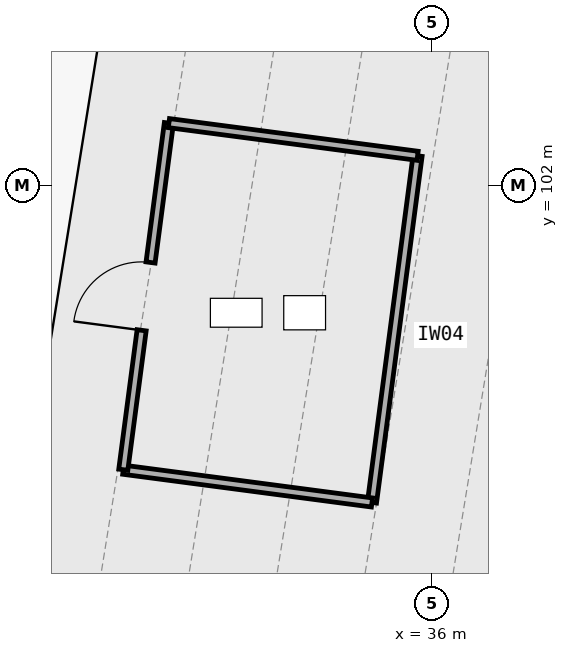
"""IFC4 building model, lengths in metres.
Left out: names, types, materials, properties, quantities, classifications, styles, units other than length and angle.
Written with IfcOpenShell. Run it as: python <this file> out.ifc"""

import sys

from ifc_helpers import new_model, si_unit, direction, frame, frame_2d, origin, place, context, subcontext, project, spatial, rectangle, extrude, element, fill, save


model = new_model("IFC4")
c1 = context("Model", 3, precision=1e-05, world=origin(), true_north=direction((0.0, 1.0)))
c2 = subcontext(c1, "Body", "Model", "MODEL_VIEW")
j1 = project(units=[si_unit("LENGTHUNIT", "METRE"), si_unit("PLANEANGLEUNIT", "RADIAN")], contexts=[c1])
p1 = place(None, origin())
s1 = spatial("IfcSite", under=j1, at=p1, CompositionType="ELEMENT")
p2 = place(p1, origin())
s2 = spatial("IfcBuilding", under=s1, at=p2, CompositionType="ELEMENT")
p3 = place(p2, frame((0.0, 0.0, 15.0)))
s3 = spatial("IfcBuildingStorey", under=s2, at=p3, CompositionType="ELEMENT", Elevation=15.0)
p4 = place(p3, frame((35.81, 102.393, 0.0), z_axis=(0.0, 0.0, 1.0), x_axis=(-0.130446275685, -0.991455379309, 0.0)))
e1 = element("IfcWall", 1, at=p4, inside=s3, PredefinedType="PARTITIONING", context=c2, shape_type="SweptSolid", body=[
    extrude(rectangle(XDim=4.6, YDim=0.12, at=frame_2d((2.3, 0.0))), origin(), (0.0, 0.0, 1.0), 4.52),
])
p5 = place(p3, frame((35.21, 97.832, 0.0), z_axis=(0.0, 0.0, 1.0), x_axis=(-0.991439181279, 0.130569329574, 0.0)))
e2 = element("IfcWall", 2, at=p5, inside=s3, PredefinedType="PARTITIONING", context=c2, shape_type="SweptSolid", body=[
    extrude(rectangle(XDim=3.3, YDim=0.12, at=frame_2d((1.65, 0.0))), origin(), (0.0, 0.0, 1.0), 4.52),
])
p6 = place(p3, frame((31.938, 98.263, 0.0), z_axis=(0.0, 0.0, 1.0), x_axis=(0.130473735985, 0.991451765956, 0.0)))
e3 = element("IfcWall", 3, at=p6, inside=s3, PredefinedType="PARTITIONING", context=c2, shape_type="SweptSolid", body=[
    extrude(rectangle(XDim=4.599, YDim=0.12, at=frame_2d((2.3, 0.0))), origin(), (0.0, 0.0, 1.0), 4.52),
])
p7 = place(p6, frame((1.85, 0.0, 0.0)))
e4 = element("IfcOpeningElement", 4, at=p7, cuts=e3, PredefinedType="OPENING", context=c2, shape_type="SweptSolid", body=[
    extrude(rectangle(XDim=0.9, YDim=2.01, at=frame_2d((0.45, 1.005))), frame((0.0, 0.07, 0.0), z_axis=(0.0, -1.0, 0.0), x_axis=(1.0, 0.0, 0.0)), (0.0, 0.0, 1.0), 0.14),
])
p8 = place(p3, frame((32.538, 102.823, 0.0), z_axis=(0.0, 0.0, 1.0), x_axis=(0.991477445815, -0.13027844964, 0.0)))
e5 = element("IfcWall", 5, at=p8, inside=s3, PredefinedType="PARTITIONING", context=c2, shape_type="SweptSolid", body=[
    extrude(rectangle(XDim=3.3, YDim=0.12, at=frame_2d((1.65, 0.0))), origin(), (0.0, 0.0, 1.0), 4.52),
])
p9 = place(p7, origin())
e6 = element("IfcDoor", 6, at=p9, inside=s3, OperationType="SINGLE_SWING_LEFT", PredefinedType="DOOR", context=c2, shape_type="SweptSolid", body=[
    extrude(rectangle(XDim=0.9, YDim=2.01, at=frame_2d((0.45, 1.005))), frame((0.0, 0.025, 0.0), z_axis=(0.0, -1.0, 0.0), x_axis=(1.0, 0.0, 0.0)), (0.0, 0.0, 1.0), 0.05),
])
fill(e4, e6)
save(model, sys.argv[1])
